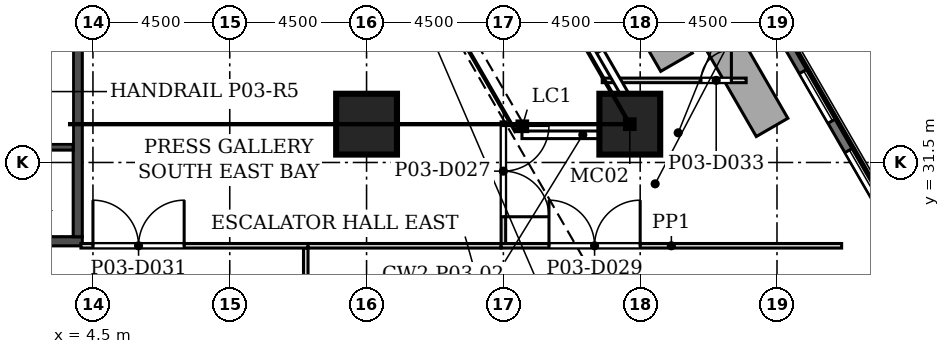
"""IFC4 building model, lengths in metres.
Left out: names, types, materials, properties, quantities, classifications, styles, units other than length and angle.
Written with IfcOpenShell. Run it as: python <this file> out.ifc"""

import sys

from ifc_helpers import new_model, si_unit, direction, frame, frame_2d, origin, origin_2d, place, context, subcontext, project, spatial, polyline, rectangle, hollow_rectangle, outline, extrude, element, fill, save


model = new_model("IFC4")
c1 = context("Model", 3, precision=1e-05, world=origin(), true_north=direction((0.0, 1.0)))
c2 = subcontext(c1, "Body", "Model", "MODEL_VIEW")
j1 = project(units=[si_unit("LENGTHUNIT", "METRE"), si_unit("PLANEANGLEUNIT", "RADIAN")], contexts=[c1])
p1 = place(None, origin())
s1 = spatial("IfcSite", under=j1, at=p1, CompositionType="ELEMENT")
p2 = place(p1, origin())
s2 = spatial("IfcBuilding", under=s1, at=p2, CompositionType="ELEMENT")
p3 = place(p2, frame((0.0, 0.0, 20.0)))
s3 = spatial("IfcBuildingStorey", under=s2, at=p3, CompositionType="ELEMENT", Elevation=20.0)
for number, where, z_axis, x_axis in (
    (1, (22.158, 32.76, 0.0), (0.0, 0.0, 1.0), (1.0, 0.0, 0.0)),
    (2, (13.5, 32.76, 0.0), (0.0, 0.0, 1.0), (1.0, 0.0, 0.0)),
):
    element("IfcColumn", number, at=place(p3, frame(where, z_axis=z_axis, x_axis=x_axis)), inside=s3, PredefinedType="COLUMN", context=c2, shape_type="SweptSolid", body=[
        extrude(rectangle(XDim=2.0, YDim=2.0, at=origin_2d()), origin(), (0.0, 0.0, 1.0), 5.0),
    ])
p4 = place(p3, frame((42.853, 8.575, 0.0), z_axis=(0.0, 0.0, 1.0), x_axis=(-0.49999894854, 0.866026010844, 0.0)))
e3 = element("IfcWall", 3, at=p4, inside=s3, PredefinedType="SOLIDWALL", context=c2, shape_type="SweptSolid", body=[
    extrude(rectangle(XDim=76.0, YDim=0.34, at=frame_2d((38.0, 0.0))), origin(), (0.0, 0.0, 1.0), 3.0),
])
p5 = place(p4, frame((1.058, 0.0, 0.9)))
e4 = element("IfcOpeningElement", 4, at=p5, cuts=e3, PredefinedType="OPENING", context=c2, shape_type="SweptSolid", body=[
    extrude(rectangle(XDim=1.885, YDim=1.9, at=frame_2d((0.942, 0.95))), frame((0.0, 0.18, 0.0), z_axis=(0.0, -1.0, 0.0), x_axis=(1.0, 0.0, 0.0)), (0.0, 0.0, 1.0), 0.36),
])
p6 = place(p4, frame((4.058, 0.0, 0.9)))
e5 = element("IfcOpeningElement", 5, at=p6, cuts=e3, PredefinedType="OPENING", context=c2, shape_type="SweptSolid", body=[
    extrude(rectangle(XDim=1.885, YDim=1.9, at=frame_2d((0.942, 0.95))), frame((0.0, 0.18, 0.0), z_axis=(0.0, -1.0, 0.0), x_axis=(1.0, 0.0, 0.0)), (0.0, 0.0, 1.0), 0.36),
])
p7 = place(p4, frame((7.058, 0.0, 0.9)))
e6 = element("IfcOpeningElement", 6, at=p7, cuts=e3, PredefinedType="OPENING", context=c2, shape_type="SweptSolid", body=[
    extrude(rectangle(XDim=1.885, YDim=1.9, at=frame_2d((0.942, 0.95))), frame((0.0, 0.18, 0.0), z_axis=(0.0, -1.0, 0.0), x_axis=(1.0, 0.0, 0.0)), (0.0, 0.0, 1.0), 0.36),
])
p8 = place(p4, frame((10.058, 0.0, 0.9)))
e7 = element("IfcOpeningElement", 7, at=p8, cuts=e3, PredefinedType="OPENING", context=c2, shape_type="SweptSolid", body=[
    extrude(rectangle(XDim=1.885, YDim=1.9, at=frame_2d((0.942, 0.95))), frame((0.0, 0.18, 0.0), z_axis=(0.0, -1.0, 0.0), x_axis=(1.0, 0.0, 0.0)), (0.0, 0.0, 1.0), 0.36),
])
p9 = place(p4, frame((13.058, 0.0, 0.9)))
e8 = element("IfcOpeningElement", 8, at=p9, cuts=e3, PredefinedType="OPENING", context=c2, shape_type="SweptSolid", body=[
    extrude(rectangle(XDim=1.885, YDim=1.9, at=frame_2d((0.942, 0.95))), frame((0.0, 0.18, 0.0), z_axis=(0.0, -1.0, 0.0), x_axis=(1.0, 0.0, 0.0)), (0.0, 0.0, 1.0), 0.36),
])
p10 = place(p4, frame((16.058, 0.0, 0.9)))
e9 = element("IfcOpeningElement", 9, at=p10, cuts=e3, PredefinedType="OPENING", context=c2, shape_type="SweptSolid", body=[
    extrude(rectangle(XDim=1.885, YDim=1.9, at=frame_2d((0.942, 0.95))), frame((0.0, 0.18, 0.0), z_axis=(0.0, -1.0, 0.0), x_axis=(1.0, 0.0, 0.0)), (0.0, 0.0, 1.0), 0.36),
])
p11 = place(p4, frame((19.058, 0.0, 0.9)))
e10 = element("IfcOpeningElement", 10, at=p11, cuts=e3, PredefinedType="OPENING", context=c2, shape_type="SweptSolid", body=[
    extrude(rectangle(XDim=1.885, YDim=1.9, at=frame_2d((0.942, 0.95))), frame((0.0, 0.18, 0.0), z_axis=(0.0, -1.0, 0.0), x_axis=(1.0, 0.0, 0.0)), (0.0, 0.0, 1.0), 0.36),
])
p12 = place(p4, frame((22.058, 0.0, 0.9)))
e11 = element("IfcOpeningElement", 11, at=p12, cuts=e3, PredefinedType="OPENING", context=c2, shape_type="SweptSolid", body=[
    extrude(rectangle(XDim=1.885, YDim=1.9, at=frame_2d((0.942, 0.95))), frame((0.0, 0.18, 0.0), z_axis=(0.0, -1.0, 0.0), x_axis=(1.0, 0.0, 0.0)), (0.0, 0.0, 1.0), 0.36),
])
p13 = place(p4, frame((25.058, 0.0, 0.9)))
e12 = element("IfcOpeningElement", 12, at=p13, cuts=e3, PredefinedType="OPENING", context=c2, shape_type="SweptSolid", body=[
    extrude(rectangle(XDim=1.885, YDim=1.9, at=frame_2d((0.942, 0.95))), frame((0.0, 0.18, 0.0), z_axis=(0.0, -1.0, 0.0), x_axis=(1.0, 0.0, 0.0)), (0.0, 0.0, 1.0), 0.36),
])
p14 = place(p4, frame((28.058, 0.0, 0.9)))
e13 = element("IfcOpeningElement", 13, at=p14, cuts=e3, PredefinedType="OPENING", context=c2, shape_type="SweptSolid", body=[
    extrude(rectangle(XDim=1.885, YDim=1.9, at=frame_2d((0.942, 0.95))), frame((0.0, 0.18, 0.0), z_axis=(0.0, -1.0, 0.0), x_axis=(1.0, 0.0, 0.0)), (0.0, 0.0, 1.0), 0.36),
])
p15 = place(p4, frame((31.058, 0.0, 0.9)))
e14 = element("IfcOpeningElement", 14, at=p15, cuts=e3, PredefinedType="OPENING", context=c2, shape_type="SweptSolid", body=[
    extrude(rectangle(XDim=1.885, YDim=1.9, at=frame_2d((0.942, 0.95))), frame((0.0, 0.18, 0.0), z_axis=(0.0, -1.0, 0.0), x_axis=(1.0, 0.0, 0.0)), (0.0, 0.0, 1.0), 0.36),
])
p16 = place(p4, frame((34.058, 0.0, 0.9)))
e15 = element("IfcOpeningElement", 15, at=p16, cuts=e3, PredefinedType="OPENING", context=c2, shape_type="SweptSolid", body=[
    extrude(rectangle(XDim=1.885, YDim=1.9, at=frame_2d((0.942, 0.95))), frame((0.0, 0.18, 0.0), z_axis=(0.0, -1.0, 0.0), x_axis=(1.0, 0.0, 0.0)), (0.0, 0.0, 1.0), 0.36),
])
p17 = place(p4, frame((37.058, 0.0, 0.9)))
e16 = element("IfcOpeningElement", 16, at=p17, cuts=e3, PredefinedType="OPENING", context=c2, shape_type="SweptSolid", body=[
    extrude(rectangle(XDim=1.885, YDim=1.9, at=frame_2d((0.942, 0.95))), frame((0.0, 0.18, 0.0), z_axis=(0.0, -1.0, 0.0), x_axis=(1.0, 0.0, 0.0)), (0.0, 0.0, 1.0), 0.36),
])
p18 = place(p4, frame((40.058, 0.0, 0.9)))
e17 = element("IfcOpeningElement", 17, at=p18, cuts=e3, PredefinedType="OPENING", context=c2, shape_type="SweptSolid", body=[
    extrude(rectangle(XDim=1.885, YDim=1.9, at=frame_2d((0.942, 0.95))), frame((0.0, 0.18, 0.0), z_axis=(0.0, -1.0, 0.0), x_axis=(1.0, 0.0, 0.0)), (0.0, 0.0, 1.0), 0.36),
])
p19 = place(p4, frame((43.058, 0.0, 0.9)))
e18 = element("IfcOpeningElement", 18, at=p19, cuts=e3, PredefinedType="OPENING", context=c2, shape_type="SweptSolid", body=[
    extrude(rectangle(XDim=1.885, YDim=1.9, at=frame_2d((0.942, 0.95))), frame((0.0, 0.18, 0.0), z_axis=(0.0, -1.0, 0.0), x_axis=(1.0, 0.0, 0.0)), (0.0, 0.0, 1.0), 0.36),
])
p20 = place(p4, frame((46.058, 0.0, 0.9)))
e19 = element("IfcOpeningElement", 19, at=p20, cuts=e3, PredefinedType="OPENING", context=c2, shape_type="SweptSolid", body=[
    extrude(rectangle(XDim=1.885, YDim=1.9, at=frame_2d((0.942, 0.95))), frame((0.0, 0.18, 0.0), z_axis=(0.0, -1.0, 0.0), x_axis=(1.0, 0.0, 0.0)), (0.0, 0.0, 1.0), 0.36),
])
p21 = place(p4, frame((49.058, 0.0, 0.9)))
e20 = element("IfcOpeningElement", 20, at=p21, cuts=e3, PredefinedType="OPENING", context=c2, shape_type="SweptSolid", body=[
    extrude(rectangle(XDim=1.885, YDim=1.9, at=frame_2d((0.942, 0.95))), frame((0.0, 0.18, 0.0), z_axis=(0.0, -1.0, 0.0), x_axis=(1.0, 0.0, 0.0)), (0.0, 0.0, 1.0), 0.36),
])
p22 = place(p4, frame((52.058, 0.0, 0.9)))
e21 = element("IfcOpeningElement", 21, at=p22, cuts=e3, PredefinedType="OPENING", context=c2, shape_type="SweptSolid", body=[
    extrude(rectangle(XDim=1.885, YDim=1.9, at=frame_2d((0.942, 0.95))), frame((0.0, 0.18, 0.0), z_axis=(0.0, -1.0, 0.0), x_axis=(1.0, 0.0, 0.0)), (0.0, 0.0, 1.0), 0.36),
])
p23 = place(p4, frame((55.058, 0.0, 0.9)))
e22 = element("IfcOpeningElement", 22, at=p23, cuts=e3, PredefinedType="OPENING", context=c2, shape_type="SweptSolid", body=[
    extrude(rectangle(XDim=1.885, YDim=1.9, at=frame_2d((0.942, 0.95))), frame((0.0, 0.18, 0.0), z_axis=(0.0, -1.0, 0.0), x_axis=(1.0, 0.0, 0.0)), (0.0, 0.0, 1.0), 0.36),
])
p24 = place(p4, frame((58.058, 0.0, 0.9)))
e23 = element("IfcOpeningElement", 23, at=p24, cuts=e3, PredefinedType="OPENING", context=c2, shape_type="SweptSolid", body=[
    extrude(rectangle(XDim=1.885, YDim=1.9, at=frame_2d((0.942, 0.95))), frame((0.0, 0.18, 0.0), z_axis=(0.0, -1.0, 0.0), x_axis=(1.0, 0.0, 0.0)), (0.0, 0.0, 1.0), 0.36),
])
p25 = place(p4, frame((61.058, 0.0, 0.9)))
e24 = element("IfcOpeningElement", 24, at=p25, cuts=e3, PredefinedType="OPENING", context=c2, shape_type="SweptSolid", body=[
    extrude(rectangle(XDim=1.885, YDim=1.9, at=frame_2d((0.942, 0.95))), frame((0.0, 0.18, 0.0), z_axis=(0.0, -1.0, 0.0), x_axis=(1.0, 0.0, 0.0)), (0.0, 0.0, 1.0), 0.36),
])
p26 = place(p4, frame((64.058, 0.0, 0.9)))
e25 = element("IfcOpeningElement", 25, at=p26, cuts=e3, PredefinedType="OPENING", context=c2, shape_type="SweptSolid", body=[
    extrude(rectangle(XDim=1.885, YDim=1.9, at=frame_2d((0.942, 0.95))), frame((0.0, 0.18, 0.0), z_axis=(0.0, -1.0, 0.0), x_axis=(1.0, 0.0, 0.0)), (0.0, 0.0, 1.0), 0.36),
])
p27 = place(p4, frame((67.058, 0.0, 0.9)))
e26 = element("IfcOpeningElement", 26, at=p27, cuts=e3, PredefinedType="OPENING", context=c2, shape_type="SweptSolid", body=[
    extrude(rectangle(XDim=1.885, YDim=1.9, at=frame_2d((0.942, 0.95))), frame((0.0, 0.18, 0.0), z_axis=(0.0, -1.0, 0.0), x_axis=(1.0, 0.0, 0.0)), (0.0, 0.0, 1.0), 0.36),
])
p28 = place(p4, frame((70.058, 0.0, 0.9)))
e27 = element("IfcOpeningElement", 27, at=p28, cuts=e3, PredefinedType="OPENING", context=c2, shape_type="SweptSolid", body=[
    extrude(rectangle(XDim=1.885, YDim=1.9, at=frame_2d((0.942, 0.95))), frame((0.0, 0.18, 0.0), z_axis=(0.0, -1.0, 0.0), x_axis=(1.0, 0.0, 0.0)), (0.0, 0.0, 1.0), 0.36),
])
p29 = place(p4, frame((73.058, 0.0, 0.9)))
e28 = element("IfcOpeningElement", 28, at=p29, cuts=e3, PredefinedType="OPENING", context=c2, shape_type="SweptSolid", body=[
    extrude(rectangle(XDim=1.885, YDim=1.9, at=frame_2d((0.942, 0.95))), frame((0.0, 0.18, 0.0), z_axis=(0.0, -1.0, 0.0), x_axis=(1.0, 0.0, 0.0)), (0.0, 0.0, 1.0), 0.36),
])
p30 = place(p3, frame((0.0, 0.0, 5.0)))
e29 = element("IfcWall", 29, at=p30, inside=s3, PredefinedType="USERDEFINED", context=c2, shape_type="SweptSolid", body=[
    extrude(outline(polyline([(24.358, 38.149), (23.319, 37.549), (26.319, 32.353), (27.358, 32.953), (24.358, 38.149)])), origin(), (0.0, 0.0, 1.0), 1.1),
])
p31 = place(p3, frame((0.0, 0.0, 5.0)))
e30 = element("IfcWall", 30, at=p31, inside=s3, PredefinedType="USERDEFINED", context=c2, shape_type="SweptSolid", body=[
    extrude(outline(polyline([(23.176, 34.497), (24.215, 35.097), (21.215, 40.293), (20.176, 39.693), (23.176, 34.497)])), origin(), (0.0, 0.0, 1.0), 1.1),
])
for number, where, z_axis, x_axis in (
    (31, (18.623, 32.69, 5.0), (0.0, 0.0, 1.0), (1.0, 0.0, 0.0)),
    (32, (22.158, 32.76, 5.0), (0.0, 0.0, 1.0), (1.0, 0.0, 0.0)),
):
    element("IfcColumn", number, at=place(p3, frame(where, z_axis=z_axis, x_axis=x_axis)), inside=s3, PredefinedType="COLUMN", context=c2, shape_type="SweptSolid", body=[
        extrude(hollow_rectangle(XDim=0.25, YDim=0.25, WallThickness=0.012, at=origin_2d()), origin(), (0.0, 0.0, 1.0), 3.6),
    ])
p32 = place(p3, frame((-4.15, 28.907, -0.3), z_axis=(0.0, 0.0, 1.0), x_axis=(1.0, 0.0, 0.0)))
e33 = element("IfcWall", 33, at=p32, inside=s3, PredefinedType="SOLIDWALL", context=c2, shape_type="SweptSolid", body=[
    extrude(rectangle(XDim=8.3, YDim=0.3, at=frame_2d((4.15, 0.0))), origin(), (0.0, 0.0, 1.0), 3.3),
])
p33 = place(p32, frame((1.55, 0.0, 0.3)))
e34 = element("IfcOpeningElement", 34, at=p33, cuts=e33, PredefinedType="OPENING", context=c2, shape_type="SweptSolid", body=[
    extrude(rectangle(XDim=1.2, YDim=2.1, at=frame_2d((0.6, 1.05))), frame((0.0, 0.16, 0.0), z_axis=(0.0, -1.0, 0.0), x_axis=(1.0, 0.0, 0.0)), (0.0, 0.0, 1.0), 0.32),
])
p34 = place(p3, frame((4.0, 29.057, -0.3), z_axis=(0.0, 0.0, 1.0), x_axis=(0.0, 1.0, 0.0)))
e35 = element("IfcWall", 35, at=p34, inside=s3, PredefinedType="SOLIDWALL", context=c2, shape_type="SweptSolid", body=[
    extrude(rectangle(XDim=6.5, YDim=0.3, at=frame_2d((3.25, 0.0))), origin(), (0.0, 0.0, 1.0), 3.3),
])
p35 = place(p3, frame((-3.85, 32.007, -0.3), z_axis=(0.0, 0.0, 1.0), x_axis=(1.0, 0.0, 0.0)))
e36 = element("IfcWall", 36, at=p35, inside=s3, PredefinedType="SOLIDWALL", context=c2, shape_type="SweptSolid", body=[
    extrude(rectangle(XDim=7.7, YDim=0.2, at=frame_2d((3.85, 0.0))), origin(), (0.0, 0.0, 1.0), 3.3),
])
p36 = place(p35, frame((0.1, 0.0, 0.3)))
e37 = element("IfcOpeningElement", 37, at=p36, cuts=e36, PredefinedType="OPENING", context=c2, shape_type="SweptSolid", body=[
    extrude(rectangle(XDim=1.2, YDim=2.1, at=frame_2d((0.6, 1.05))), frame((0.0, 0.11, 0.0), z_axis=(0.0, -1.0, 0.0), x_axis=(1.0, 0.0, 0.0)), (0.0, 0.0, 1.0), 0.22),
])
p37 = place(p3, frame((11.5, 28.685, 0.0), z_axis=(0.0, 0.0, 1.0), x_axis=(0.0, -1.0, 0.0)))
e38 = element("IfcWall", 38, at=p37, inside=s3, PredefinedType="PARTITIONING", context=c2, shape_type="SweptSolid", body=[
    extrude(rectangle(XDim=5.76, YDim=0.15, at=frame_2d((2.88, 0.0))), origin(), (0.0, 0.0, 1.0), 3.0),
])
p38 = place(p37, frame((1.185, 0.0, 0.0)))
e39 = element("IfcOpeningElement", 39, at=p38, cuts=e38, PredefinedType="OPENING", context=c2, shape_type="SweptSolid", body=[
    extrude(rectangle(XDim=3.0, YDim=2.4, at=frame_2d((1.5, 1.2))), frame((0.0, 0.085, 0.0), z_axis=(0.0, -1.0, 0.0), x_axis=(1.0, 0.0, 0.0)), (0.0, 0.0, 1.0), 0.17),
])
p39 = place(p3, frame((4.105, 28.76, 0.0), z_axis=(0.0, 0.0, 1.0), x_axis=(1.0, 0.0, 0.0)))
e40 = element("IfcWall", 40, at=p39, inside=s3, PredefinedType="PARTITIONING", context=c2, shape_type="SweptSolid", body=[
    extrude(rectangle(XDim=7.47, YDim=0.15, at=frame_2d((3.735, 0.0))), origin(), (0.0, 0.0, 1.0), 3.0),
])
p40 = place(p39, frame((0.395, 0.0, 0.0)))
e41 = element("IfcOpeningElement", 41, at=p40, cuts=e40, PredefinedType="OPENING", context=c2, shape_type="SweptSolid", body=[
    extrude(rectangle(XDim=3.0, YDim=2.4, at=frame_2d((1.5, 1.2))), frame((0.0, 0.085, 0.0), z_axis=(0.0, -1.0, 0.0), x_axis=(1.0, 0.0, 0.0)), (0.0, 0.0, 1.0), 0.17),
])
p41 = place(p3, frame((11.575, 28.76, 0.0), z_axis=(0.0, 0.0, 1.0), x_axis=(1.0, 0.0, 0.0)))
e42 = element("IfcWall", 42, at=p41, inside=s3, PredefinedType="PARTITIONING", context=c2, shape_type="SweptSolid", body=[
    extrude(rectangle(XDim=6.35, YDim=0.15, at=frame_2d((3.175, 0.0))), origin(), (0.0, 0.0, 1.0), 3.0),
])
p42 = place(p3, frame((17.925, 28.76, 0.0), z_axis=(0.0, 0.0, 1.0), x_axis=(1.0, 0.0, 0.0)))
e43 = element("IfcWall", 43, at=p42, inside=s3, PredefinedType="PARTITIONING", context=c2, shape_type="SweptSolid", body=[
    extrude(rectangle(XDim=11.201, YDim=0.15, at=frame_2d((5.601, 0.0))), origin(), (0.0, 0.0, 1.0), 3.0),
])
p43 = place(p42, frame((1.575, 0.0, 0.0)))
e44 = element("IfcOpeningElement", 44, at=p43, cuts=e43, PredefinedType="OPENING", context=c2, shape_type="SweptSolid", body=[
    extrude(rectangle(XDim=3.0, YDim=2.4, at=frame_2d((1.5, 1.2))), frame((0.0, 0.085, 0.0), z_axis=(0.0, -1.0, 0.0), x_axis=(1.0, 0.0, 0.0)), (0.0, 0.0, 1.0), 0.17),
])
p44 = place(p3, frame((18.0, 28.835, 0.0), z_axis=(0.0, 0.0, 1.0), x_axis=(0.0, 1.0, 0.0)))
e45 = element("IfcWall", 45, at=p44, inside=s3, PredefinedType="PARTITIONING", context=c2, shape_type="SweptSolid", body=[
    extrude(rectangle(XDim=4.0, YDim=0.15, at=frame_2d((2.0, 0.0))), origin(), (0.0, 0.0, 1.0), 3.0),
])
p45 = place(p44, frame((0.88, 0.0, 0.0)))
e46 = element("IfcOpeningElement", 46, at=p45, cuts=e45, PredefinedType="OPENING", context=c2, shape_type="SweptSolid", body=[
    extrude(rectangle(XDim=3.0, YDim=2.4, at=frame_2d((1.5, 1.2))), frame((0.0, 0.085, 0.0), z_axis=(0.0, -1.0, 0.0), x_axis=(1.0, 0.0, 0.0)), (0.0, 0.0, 1.0), 0.17),
])
p46 = place(p3, frame((21.251, 34.2, 0.0), z_axis=(0.0, 0.0, 1.0), x_axis=(1.0, 0.0, 0.0)))
e47 = element("IfcWall", 47, at=p46, inside=s3, PredefinedType="PARTITIONING", context=c2, shape_type="SweptSolid", body=[
    extrude(rectangle(XDim=4.734, YDim=0.15, at=frame_2d((2.367, 0.0))), origin(), (0.0, 0.0, 1.0), 3.0),
])
p47 = place(p46, frame((3.249, 0.0, 0.0)))
e48 = element("IfcOpeningElement", 48, at=p47, cuts=e47, PredefinedType="OPENING", context=c2, shape_type="SweptSolid", body=[
    extrude(rectangle(XDim=1.0, YDim=2.1, at=frame_2d((0.5, 1.05))), frame((0.0, 0.085, 0.0), z_axis=(0.0, -1.0, 0.0), x_axis=(1.0, 0.0, 0.0)), (0.0, 0.0, 1.0), 0.17),
])
p48 = place(p13, origin())
e49 = element("IfcWindow", 49, at=p48, inside=s3, PartitioningType="SINGLE_PANEL", PredefinedType="WINDOW", context=c2, shape_type="SweptSolid", body=[
    extrude(rectangle(XDim=1.885, YDim=1.9, at=frame_2d((0.942, 0.95))), frame((0.0, 0.11, 0.0), z_axis=(0.0, -1.0, 0.0), x_axis=(1.0, 0.0, 0.0)), (0.0, 0.0, 1.0), 0.06),
])
fill(e12, e49)
p49 = place(p14, origin())
e50 = element("IfcWindow", 50, at=p49, inside=s3, PartitioningType="SINGLE_PANEL", PredefinedType="WINDOW", context=c2, shape_type="SweptSolid", body=[
    extrude(rectangle(XDim=1.885, YDim=1.9, at=frame_2d((0.942, 0.95))), frame((0.0, 0.11, 0.0), z_axis=(0.0, -1.0, 0.0), x_axis=(1.0, 0.0, 0.0)), (0.0, 0.0, 1.0), 0.06),
])
fill(e13, e50)
p50 = place(p45, frame((3.0, 0.0, 0.0), z_axis=(0.0, 0.0, 1.0), x_axis=(-1.0, 0.0, 0.0)))
e51 = element("IfcDoor", 51, at=p50, inside=s3, OperationType="DOUBLE_DOOR_SINGLE_SWING", PredefinedType="DOOR", context=c2, shape_type="SweptSolid", body=[
    extrude(rectangle(XDim=3.0, YDim=2.4, at=frame_2d((1.5, 1.2))), frame((0.0, 0.025, 0.0), z_axis=(0.0, -1.0, 0.0), x_axis=(1.0, 0.0, 0.0)), (0.0, 0.0, 1.0), 0.05),
])
fill(e46, e51)
p51 = place(p43, origin())
e52 = element("IfcDoor", 52, at=p51, inside=s3, OperationType="DOUBLE_DOOR_SINGLE_SWING", PredefinedType="DOOR", context=c2, shape_type="SweptSolid", body=[
    extrude(rectangle(XDim=3.0, YDim=2.4, at=frame_2d((1.5, 1.2))), frame((0.0, 0.025, 0.0), z_axis=(0.0, -1.0, 0.0), x_axis=(1.0, 0.0, 0.0)), (0.0, 0.0, 1.0), 0.05),
])
fill(e44, e52)
p52 = place(p40, origin())
e53 = element("IfcDoor", 53, at=p52, inside=s3, OperationType="DOUBLE_DOOR_SINGLE_SWING", PredefinedType="DOOR", context=c2, shape_type="SweptSolid", body=[
    extrude(rectangle(XDim=3.0, YDim=2.4, at=frame_2d((1.5, 1.2))), frame((0.0, 0.025, 0.0), z_axis=(0.0, -1.0, 0.0), x_axis=(1.0, 0.0, 0.0)), (0.0, 0.0, 1.0), 0.05),
])
fill(e41, e53)
p53 = place(p47, origin())
e54 = element("IfcDoor", 54, at=p53, inside=s3, OperationType="SINGLE_SWING_RIGHT", PredefinedType="DOOR", context=c2, shape_type="SweptSolid", body=[
    extrude(rectangle(XDim=1.0, YDim=2.1, at=frame_2d((0.5, 1.05))), frame((0.0, 0.025, 0.0), z_axis=(0.0, -1.0, 0.0), x_axis=(1.0, 0.0, 0.0)), (0.0, 0.0, 1.0), 0.05),
])
fill(e48, e54)
save(model, sys.argv[1])
